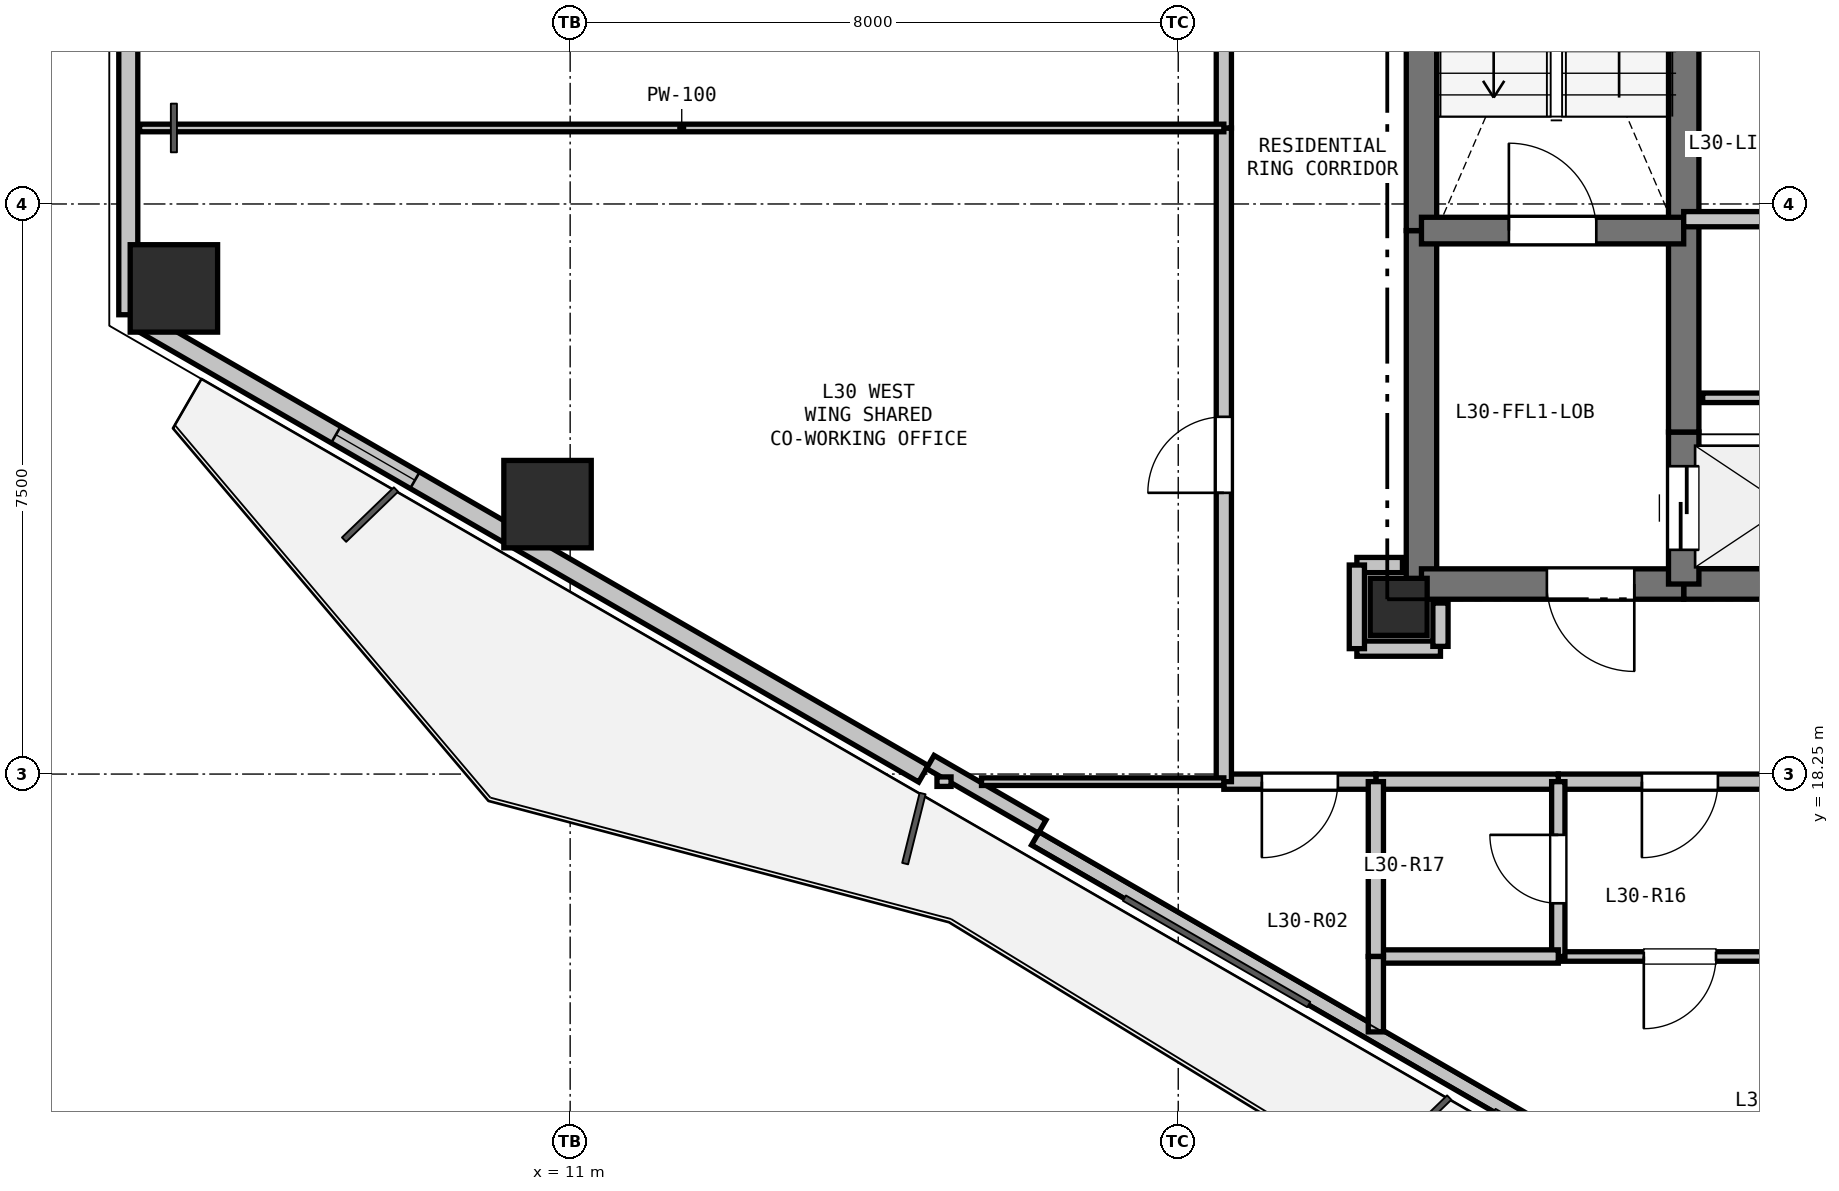
"""IFC4 building model, lengths in metres.
Left out: names, types, materials, properties, quantities, classifications, styles, units other than length and angle.
Written with IfcOpenShell. Run it as: python <this file> out.ifc"""

import sys

from ifc_helpers import new_model, si_unit, direction, frame, frame_2d, origin, origin_2d, place, context, subcontext, project, spatial, rectangle, hollow_rectangle, extrude, element, fill, save


model = new_model("IFC4")
c1 = context("Model", 3, precision=1e-05, world=origin(), true_north=direction((0.0, 1.0)))
c2 = subcontext(c1, "Body", "Model", "MODEL_VIEW")
j1 = project(units=[si_unit("LENGTHUNIT", "METRE"), si_unit("PLANEANGLEUNIT", "RADIAN")], contexts=[c1])
p1 = place(None, origin())
s1 = spatial("IfcSite", under=j1, at=p1, CompositionType="ELEMENT")
p2 = place(p1, origin())
s2 = spatial("IfcBuilding", under=s1, at=p2, CompositionType="ELEMENT")
p3 = place(p2, frame((0.0, 0.0, 109.8)))
s3 = spatial("IfcBuildingStorey", under=s2, at=p3, CompositionType="ELEMENT", Elevation=109.8)
p4 = place(p3, frame((21.9, 20.45, 0.0), z_axis=(0.0, 0.0, 1.0), x_axis=(1.0, 0.0, 0.0)))
e1 = element("IfcColumn", 1, at=p4, inside=s3, PredefinedType="COLUMN", context=c2, shape_type="SweptSolid", body=[
    extrude(rectangle(XDim=0.75, YDim=0.75, at=origin_2d()), origin(), (0.0, 0.0, 1.0), 3.3),
])
for number, where, z_axis, x_axis in (
    (2, (10.702, 21.801, 0.0), (0.0, 0.0, 1.0), (1.0, 0.0, 0.0)),
    (3, (5.787, 24.639, 0.0), (0.0, 0.0, 1.0), (1.0, 0.0, 0.0)),
):
    element("IfcColumn", number, at=place(p3, frame(where, z_axis=z_axis, x_axis=x_axis)), inside=s3, PredefinedType="COLUMN", context=c2, shape_type="SweptSolid", body=[
        extrude(hollow_rectangle(XDim=1.15, YDim=1.15, WallThickness=0.032, at=origin_2d()), origin(), (0.0, 0.0, 1.0), 3.3),
    ])
p5 = place(p3, frame((5.187, 24.293, 0.0), z_axis=(0.0, 0.0, 1.0), x_axis=(0.0, 1.0, 0.0)))
e4 = element("IfcWall", 4, at=p5, inside=s3, PredefinedType="SOLIDWALL", context=c2, shape_type="SweptSolid", body=[
    extrude(rectangle(XDim=4.915, YDim=0.25, at=frame_2d((2.457, 0.0))), origin(), (0.0, 0.0, 1.0), 2.67),
])
p6 = place(p3, frame((26.845, 11.788, 0.0), z_axis=(0.0, 0.0, 1.0), x_axis=(-0.866027010039, 0.499997217876, 0.0)))
e5 = element("IfcWall", 5, at=p6, inside=s3, PredefinedType="PARAPET", context=c2, shape_type="SweptSolid", body=[
    extrude(rectangle(XDim=11.229, YDim=0.2, at=frame_2d((5.615, 0.0))), origin(), (0.0, 0.0, 1.0), 0.2),
])
p7 = place(p3, frame((15.648, 18.253, 0.0), z_axis=(0.0, 0.0, 1.0), x_axis=(-0.866023023012, 0.500004123596, 0.0)))
e6 = element("IfcWall", 6, at=p7, inside=s3, PredefinedType="SOLIDWALL", context=c2, shape_type="SweptSolid", body=[
    extrude(rectangle(XDim=11.93, YDim=0.25, at=frame_2d((5.965, 0.0))), origin(), (0.0, 0.0, 1.0), 2.67),
])
p8 = place(p7, frame((7.725, 0.0, 0.9)))
e7 = element("IfcOpeningElement", 7, at=p8, cuts=e6, PredefinedType="OPENING", context=c2, shape_type="SweptSolid", body=[
    extrude(rectangle(XDim=1.2, YDim=1.5, at=frame_2d((0.6, 0.75))), frame((0.0, 0.135, 0.0), z_axis=(0.0, -1.0, 0.0), x_axis=(1.0, 0.0, 0.0)), (0.0, 0.0, 1.0), 0.27),
])
p9 = place(p3, frame((17.21, 17.559, 0.0), z_axis=(0.0, 0.0, 1.0), x_axis=(-0.866025371046, 0.500000056704, 0.0)))
e8 = element("IfcWall", 8, at=p9, inside=s3, PredefinedType="PARAPET", context=c2, shape_type="SweptSolid", body=[
    extrude(rectangle(XDim=1.7, YDim=0.2, at=frame_2d((0.85, 0.0))), origin(), (0.0, 0.0, 1.0), 2.67),
])
p10 = place(p3, frame((22.2, 20.75, 0.0), z_axis=(0.0, 0.0, 1.0), x_axis=(0.0, 1.0, 0.0)))
e9 = element("IfcWall", 9, at=p10, inside=s3, PredefinedType="SHEAR", context=c2, shape_type="SweptSolid", body=[
    extrude(rectangle(XDim=4.65, YDim=0.4, at=frame_2d((2.325, 0.0))), origin(), (0.0, 0.0, 1.0), 3.05),
])
p11 = place(p3, frame((22.2, 25.4, 0.0), z_axis=(0.0, 0.0, 1.0), x_axis=(0.0, 1.0, 0.0)))
e10 = element("IfcWall", 10, at=p11, inside=s3, PredefinedType="SHEAR", context=c2, shape_type="SweptSolid", body=[
    extrude(rectangle(XDim=7.35, YDim=0.4, at=frame_2d((3.675, 0.0))), origin(), (0.0, 0.0, 1.0), 3.05),
])
p12 = place(p3, frame((28.35, 20.75, 0.0), z_axis=(0.0, 0.0, 1.0), x_axis=(-1.0, 0.0, 0.0)))
e11 = element("IfcWall", 11, at=p12, inside=s3, PredefinedType="SHEAR", context=c2, shape_type="SweptSolid", body=[
    extrude(rectangle(XDim=2.7, YDim=0.4, at=frame_2d((1.35, 0.0))), origin(), (0.0, 0.0, 1.0), 3.05),
])
p13 = place(p3, frame((25.65, 20.75, 0.0), z_axis=(0.0, 0.0, 1.0), x_axis=(-1.0, 0.0, 0.0)))
e12 = element("IfcWall", 12, at=p13, inside=s3, PredefinedType="SHEAR", context=c2, shape_type="SweptSolid", body=[
    extrude(rectangle(XDim=3.45, YDim=0.4, at=frame_2d((1.725, 0.0))), origin(), (0.0, 0.0, 1.0), 3.05),
])
p14 = place(p13, frame((0.65, 0.0, 0.0)))
e13 = element("IfcOpeningElement", 13, at=p14, cuts=e12, PredefinedType="OPENING", context=c2, shape_type="SweptSolid", body=[
    extrude(rectangle(XDim=1.15, YDim=2.15, at=frame_2d((0.575, 1.075))), frame((0.0, 0.21, 0.0), z_axis=(0.0, -1.0, 0.0), x_axis=(1.0, 0.0, 0.0)), (0.0, 0.0, 1.0), 0.42),
])
p15 = place(p3, frame((25.65, 20.75, 0.0), z_axis=(0.0, 0.0, 1.0), x_axis=(0.0, 1.0, 0.0)))
e14 = element("IfcWall", 14, at=p15, inside=s3, PredefinedType="SHEAR", context=c2, shape_type="SweptSolid", body=[
    extrude(rectangle(XDim=2.0, YDim=0.4, at=frame_2d((1.0, 0.0))), origin(), (0.0, 0.0, 1.0), 3.05),
])
p16 = place(p15, frame((0.45, 0.0, 0.0)))
e15 = element("IfcOpeningElement", 15, at=p16, cuts=e14, PredefinedType="OPENING", context=c2, shape_type="SweptSolid", body=[
    extrude(rectangle(XDim=1.1, YDim=2.15, at=frame_2d((0.55, 1.075))), frame((0.0, 0.21, 0.0), z_axis=(0.0, -1.0, 0.0), x_axis=(1.0, 0.0, 0.0)), (0.0, 0.0, 1.0), 0.42),
])
p17 = place(p3, frame((25.65, 22.75, 0.0), z_axis=(0.0, 0.0, 1.0), x_axis=(0.0, 1.0, 0.0)))
e16 = element("IfcWall", 16, at=p17, inside=s3, PredefinedType="SHEAR", context=c2, shape_type="SweptSolid", body=[
    extrude(rectangle(XDim=2.8, YDim=0.4, at=frame_2d((1.4, 0.0))), origin(), (0.0, 0.0, 1.0), 3.05),
])
p18 = place(p3, frame((25.65, 25.55, 0.0), z_axis=(0.0, 0.0, 1.0), x_axis=(0.0, 1.0, 0.0)))
e17 = element("IfcWall", 17, at=p18, inside=s3, PredefinedType="SHEAR", context=c2, shape_type="SweptSolid", body=[
    extrude(rectangle(XDim=2.4, YDim=0.4, at=frame_2d((1.2, 0.0))), origin(), (0.0, 0.0, 1.0), 3.05),
])
p19 = place(p3, frame((22.2, 25.4, 0.0), z_axis=(0.0, 0.0, 1.0), x_axis=(1.0, 0.0, 0.0)))
e18 = element("IfcWall", 18, at=p19, inside=s3, PredefinedType="SHEAR", context=c2, shape_type="SweptSolid", body=[
    extrude(rectangle(XDim=3.45, YDim=0.35, at=frame_2d((1.725, 0.0))), origin(), (0.0, 0.0, 1.0), 3.05),
])
p20 = place(p19, frame((1.15, 0.0, 0.0)))
e19 = element("IfcOpeningElement", 19, at=p20, cuts=e18, PredefinedType="OPENING", context=c2, shape_type="SweptSolid", body=[
    extrude(rectangle(XDim=1.15, YDim=2.15, at=frame_2d((0.575, 1.075))), frame((0.0, 0.185, 0.0), z_axis=(0.0, -1.0, 0.0), x_axis=(1.0, 0.0, 0.0)), (0.0, 0.0, 1.0), 0.37),
])
p21 = place(p3, frame((25.65, 25.55, 0.0), z_axis=(0.0, 0.0, 1.0), x_axis=(1.0, 0.0, 0.0)))
e20 = element("IfcWall", 20, at=p21, inside=s3, PredefinedType="PARTITIONING", context=c2, shape_type="SweptSolid", body=[
    extrude(rectangle(XDim=4.95, YDim=0.2, at=frame_2d((2.475, 0.0))), origin(), (0.0, 0.0, 1.0), 3.05),
])
p22 = place(p3, frame((25.9, 23.2, 0.0), z_axis=(0.0, 0.0, 1.0), x_axis=(1.0, 0.0, 0.0)))
e21 = element("IfcWall", 21, at=p22, inside=s3, PredefinedType="PARTITIONING", context=c2, shape_type="SweptSolid", body=[
    extrude(rectangle(XDim=1.4, YDim=0.125, at=frame_2d((0.7, 0.0))), origin(), (0.0, 0.0, 1.0), 3.05),
])
p23 = place(p3, frame((21.35, 19.9, 0.0), z_axis=(0.0, 0.0, 1.0), x_axis=(1.0, 0.0, 0.0)))
e22 = element("IfcWall", 22, at=p23, inside=s3, PredefinedType="PARTITIONING", context=c2, shape_type="SweptSolid", body=[
    extrude(rectangle(XDim=1.1, YDim=0.2, at=frame_2d((0.55, 0.0))), origin(), (0.0, 0.0, 1.0), 2.423),
])
p24 = place(p3, frame((22.45, 19.93, 0.0), z_axis=(0.0, 0.0, 1.0), x_axis=(0.0, 1.0, 0.0)))
e23 = element("IfcWall", 23, at=p24, inside=s3, PredefinedType="PARTITIONING", context=c2, shape_type="SweptSolid", body=[
    extrude(rectangle(XDim=0.57, YDim=0.2, at=frame_2d((0.285, 0.0))), origin(), (0.0, 0.0, 1.0), 2.423),
])
p25 = place(p3, frame((27.2, 18.15, 0.0), z_axis=(0.0, 0.0, 1.0), x_axis=(-1.0, 0.0, 0.0)))
e24 = element("IfcWall", 24, at=p25, inside=s3, PredefinedType="PARTITIONING", context=c2, shape_type="SweptSolid", body=[
    extrude(rectangle(XDim=3.2, YDim=0.2, at=frame_2d((1.6, 0.0))), origin(), (0.0, 0.0, 1.0), 2.423),
])
p26 = place(p25, frame((1.1, 0.0, 0.0)))
e25 = element("IfcOpeningElement", 25, at=p26, cuts=e24, PredefinedType="OPENING", context=c2, shape_type="SweptSolid", body=[
    extrude(rectangle(XDim=1.0, YDim=2.15, at=frame_2d((0.5, 1.075))), frame((0.0, 0.11, 0.0), z_axis=(0.0, -1.0, 0.0), x_axis=(1.0, 0.0, 0.0)), (0.0, 0.0, 1.0), 0.22),
])
p27 = place(p3, frame((24.0, 18.15, 0.0), z_axis=(0.0, 0.0, 1.0), x_axis=(-1.0, 0.0, 0.0)))
e26 = element("IfcWall", 26, at=p27, inside=s3, PredefinedType="PARTITIONING", context=c2, shape_type="SweptSolid", body=[
    extrude(rectangle(XDim=2.4, YDim=0.2, at=frame_2d((1.2, 0.0))), origin(), (0.0, 0.0, 1.0), 2.423),
])
p28 = place(p3, frame((21.6, 18.15, 0.0), z_axis=(0.0, 0.0, 1.0), x_axis=(-1.0, 0.0, 0.0)))
e27 = element("IfcWall", 27, at=p28, inside=s3, PredefinedType="PARTITIONING", context=c2, shape_type="SweptSolid", body=[
    extrude(rectangle(XDim=2.0, YDim=0.2, at=frame_2d((1.0, 0.0))), origin(), (0.0, 0.0, 1.0), 3.05),
])
p29 = place(p28, frame((0.5, 0.0, 0.0)))
e28 = element("IfcOpeningElement", 28, at=p29, cuts=e27, PredefinedType="OPENING", context=c2, shape_type="SweptSolid", body=[
    extrude(rectangle(XDim=1.0, YDim=2.15, at=frame_2d((0.5, 1.075))), frame((0.0, 0.11, 0.0), z_axis=(0.0, -1.0, 0.0), x_axis=(1.0, 0.0, 0.0)), (0.0, 0.0, 1.0), 0.22),
])
p30 = place(p3, frame((19.6, 18.15, 0.0), z_axis=(0.0, 0.0, 1.0), x_axis=(0.0, 1.0, 0.0)))
e29 = element("IfcWall", 29, at=p30, inside=s3, PredefinedType="PARTITIONING", context=c2, shape_type="SweptSolid", body=[
    extrude(rectangle(XDim=8.6, YDim=0.2, at=frame_2d((4.3, 0.0))), origin(), (0.0, 0.0, 1.0), 2.423),
])
p31 = place(p30, frame((3.8, 0.0, 0.0)))
e30 = element("IfcOpeningElement", 30, at=p31, cuts=e29, PredefinedType="OPENING", context=c2, shape_type="SweptSolid", body=[
    extrude(rectangle(XDim=1.0, YDim=2.15, at=frame_2d((0.5, 1.075))), frame((0.0, 0.11, 0.0), z_axis=(0.0, -1.0, 0.0), x_axis=(1.0, 0.0, 0.0)), (0.0, 0.0, 1.0), 0.22),
])
p32 = place(p3, frame((19.6, 26.75, 0.0), z_axis=(0.0, 0.0, 1.0), x_axis=(0.0, 1.0, 0.0)))
e31 = element("IfcWall", 31, at=p32, inside=s3, PredefinedType="PARTITIONING", context=c2, shape_type="SweptSolid", body=[
    extrude(rectangle(XDim=8.6, YDim=0.2, at=frame_2d((4.3, 0.0))), origin(), (0.0, 0.0, 1.0), 2.423),
])
p33 = place(p32, frame((3.4, 0.0, 0.0)))
e32 = element("IfcOpeningElement", 32, at=p33, cuts=e31, PredefinedType="OPENING", context=c2, shape_type="SweptSolid", body=[
    extrude(rectangle(XDim=1.8, YDim=2.2, at=frame_2d((0.9, 1.1))), frame((0.0, 0.11, 0.0), z_axis=(0.0, -1.0, 0.0), x_axis=(1.0, 0.0, 0.0)), (0.0, 0.0, 1.0), 0.22),
])
p34 = place(p3, frame((21.95, 21.0, 0.0), z_axis=(0.0, 0.0, 1.0), x_axis=(-1.0, 0.0, 0.0)))
e33 = element("IfcWall", 33, at=p34, inside=s3, PredefinedType="PARTITIONING", context=c2, shape_type="SweptSolid", body=[
    extrude(rectangle(XDim=0.6, YDim=0.2, at=frame_2d((0.3, 0.0))), origin(), (0.0, 0.0, 1.0), 2.498),
])
p35 = place(p3, frame((21.35, 21.0, 0.0), z_axis=(0.0, 0.0, 1.0), x_axis=(0.0, -1.0, 0.0)))
e34 = element("IfcWall", 34, at=p35, inside=s3, PredefinedType="PARTITIONING", context=c2, shape_type="SweptSolid", body=[
    extrude(rectangle(XDim=1.1, YDim=0.2, at=frame_2d((0.55, 0.0))), origin(), (0.0, 0.0, 1.0), 2.423),
])
p36 = place(p3, frame((27.2, 15.85, 0.0), z_axis=(0.0, 0.0, 1.0), x_axis=(-1.0, 0.0, 0.0)))
e35 = element("IfcWall", 35, at=p36, inside=s3, PredefinedType="PARTITIONING", context=c2, shape_type="SweptSolid", body=[
    extrude(rectangle(XDim=3.2, YDim=0.125, at=frame_2d((1.6, 0.0))), origin(), (0.0, 0.0, 1.0), 2.423),
])
p37 = place(p36, frame((1.125, 0.0, 0.0)))
e36 = element("IfcOpeningElement", 36, at=p37, cuts=e35, PredefinedType="OPENING", context=c2, shape_type="SweptSolid", body=[
    extrude(rectangle(XDim=0.95, YDim=2.1, at=frame_2d((0.475, 1.05))), frame((0.0, 0.073, 0.0), z_axis=(0.0, -1.0, 0.0), x_axis=(1.0, 0.0, 0.0)), (0.0, 0.0, 1.0), 0.145),
])
p38 = place(p3, frame((24.0, 15.85, 0.0), z_axis=(0.0, 0.0, 1.0), x_axis=(0.0, 1.0, 0.0)))
e37 = element("IfcWall", 37, at=p38, inside=s3, PredefinedType="PLUMBINGWALL", context=c2, shape_type="SweptSolid", body=[
    extrude(rectangle(XDim=2.3, YDim=0.175, at=frame_2d((1.15, 0.0))), origin(), (0.0, 0.0, 1.0), 2.423),
])
p39 = place(p38, frame((0.7, 0.0, 0.0)))
e38 = element("IfcOpeningElement", 38, at=p39, cuts=e37, PredefinedType="OPENING", context=c2, shape_type="SweptSolid", body=[
    extrude(rectangle(XDim=0.9, YDim=2.1, at=frame_2d((0.45, 1.05))), frame((0.0, 0.097, 0.0), z_axis=(0.0, -1.0, 0.0), x_axis=(1.0, 0.0, 0.0)), (0.0, 0.0, 1.0), 0.195),
])
p40 = place(p3, frame((24.0, 15.85, 0.0), z_axis=(0.0, 0.0, 1.0), x_axis=(-1.0, 0.0, 0.0)))
e39 = element("IfcWall", 39, at=p40, inside=s3, PredefinedType="PLUMBINGWALL", context=c2, shape_type="SweptSolid", body=[
    extrude(rectangle(XDim=2.4, YDim=0.175, at=frame_2d((1.2, 0.0))), origin(), (0.0, 0.0, 1.0), 3.05),
])
p41 = place(p3, frame((21.6, 15.85, 0.0), z_axis=(0.0, 0.0, 1.0), x_axis=(0.0, 1.0, 0.0)))
e40 = element("IfcWall", 40, at=p41, inside=s3, PredefinedType="PARTITIONING", context=c2, shape_type="SweptSolid", body=[
    extrude(rectangle(XDim=2.3, YDim=0.2, at=frame_2d((1.15, 0.0))), origin(), (0.0, 0.0, 1.0), 3.05),
])
p42 = place(p3, frame((15.826, 18.15, 0.0), z_axis=(0.0, 0.0, 1.0), x_axis=(1.0, 0.0, 0.0)))
e41 = element("IfcWall", 41, at=p42, inside=s3, PredefinedType="PARTITIONING", context=c2, shape_type="SweptSolid", body=[
    extrude(rectangle(XDim=0.185, YDim=0.125, at=frame_2d((0.093, 0.0))), origin(), (0.0, 0.0, 1.0), 3.05),
])
p43 = place(p3, frame((16.412, 18.15, 0.0), z_axis=(0.0, 0.0, 1.0), x_axis=(1.0, 0.0, 0.0)))
e42 = element("IfcWall", 42, at=p43, inside=s3, PredefinedType="PARTITIONING", context=c2, shape_type="SweptSolid", body=[
    extrude(rectangle(XDim=3.188, YDim=0.1, at=frame_2d((1.594, 0.0))), origin(), (0.0, 0.0, 1.0), 2.365),
])
p44 = place(p3, frame((21.6, 15.85, 0.0), z_axis=(0.0, 0.0, 1.0), x_axis=(0.0, -1.0, 0.0)))
e43 = element("IfcWall", 43, at=p44, inside=s3, PredefinedType="PARTITIONING", context=c2, shape_type="SweptSolid", body=[
    extrude(rectangle(XDim=0.992, YDim=0.2, at=frame_2d((0.496, 0.0))), origin(), (0.0, 0.0, 1.0), 2.365),
])
p45 = place(p3, frame((5.336, 26.75, 0.0), z_axis=(0.0, 0.0, 1.0), x_axis=(1.0, 0.0, 0.0)))
e44 = element("IfcWall", 44, at=p45, inside=s3, PredefinedType="PARTITIONING", context=c2, shape_type="SweptSolid", body=[
    extrude(rectangle(XDim=14.264, YDim=0.1, at=frame_2d((7.132, 0.0))), origin(), (0.0, 0.0, 1.0), 2.714),
])
p46 = place(p8, origin())
e45 = element("IfcWindow", 45, at=p46, inside=s3, PartitioningType="SINGLE_PANEL", PredefinedType="WINDOW", context=c2, shape_type="SweptSolid", body=[
    extrude(rectangle(XDim=1.2, YDim=1.5, at=frame_2d((0.6, 0.75))), frame((0.0, 0.03, 0.0), z_axis=(0.0, -1.0, 0.0), x_axis=(1.0, 0.0, 0.0)), (0.0, 0.0, 1.0), 0.06),
])
fill(e7, e45)
p47 = place(p16, origin())
e46 = element("IfcDoor", 46, at=p47, inside=s3, OperationType="SLIDING_TO_LEFT", PredefinedType="DOOR", context=c2, shape_type="SweptSolid", body=[
    extrude(rectangle(XDim=1.1, YDim=2.15, at=frame_2d((0.55, 1.075))), frame((0.0, 0.025, 0.0), z_axis=(0.0, -1.0, 0.0), x_axis=(1.0, 0.0, 0.0)), (0.0, 0.0, 1.0), 0.05),
])
fill(e15, e46)
p48 = place(p20, origin())
e47 = element("IfcDoor", 47, at=p48, inside=s3, OperationType="SINGLE_SWING_LEFT", PredefinedType="DOOR", context=c2, shape_type="SweptSolid", body=[
    extrude(rectangle(XDim=1.15, YDim=2.15, at=frame_2d((0.575, 1.075))), frame((0.0, 0.025, 0.0), z_axis=(0.0, -1.0, 0.0), x_axis=(1.0, 0.0, 0.0)), (0.0, 0.0, 1.0), 0.05),
])
fill(e19, e47)
p49 = place(p14, origin())
e48 = element("IfcDoor", 48, at=p49, inside=s3, OperationType="SINGLE_SWING_LEFT", PredefinedType="DOOR", context=c2, shape_type="SweptSolid", body=[
    extrude(rectangle(XDim=1.15, YDim=2.15, at=frame_2d((0.575, 1.075))), frame((0.0, 0.025, 0.0), z_axis=(0.0, -1.0, 0.0), x_axis=(1.0, 0.0, 0.0)), (0.0, 0.0, 1.0), 0.05),
])
fill(e13, e48)
p50 = place(p26, origin())
e49 = element("IfcDoor", 49, at=p50, inside=s3, OperationType="SINGLE_SWING_RIGHT", PredefinedType="DOOR", context=c2, shape_type="SweptSolid", body=[
    extrude(rectangle(XDim=1.0, YDim=2.15, at=frame_2d((0.5, 1.075))), frame((0.0, 0.025, 0.0), z_axis=(0.0, -1.0, 0.0), x_axis=(1.0, 0.0, 0.0)), (0.0, 0.0, 1.0), 0.05),
])
fill(e25, e49)
p51 = place(p29, origin())
e50 = element("IfcDoor", 50, at=p51, inside=s3, OperationType="SINGLE_SWING_RIGHT", PredefinedType="DOOR", context=c2, shape_type="SweptSolid", body=[
    extrude(rectangle(XDim=1.0, YDim=2.15, at=frame_2d((0.5, 1.075))), frame((0.0, 0.025, 0.0), z_axis=(0.0, -1.0, 0.0), x_axis=(1.0, 0.0, 0.0)), (0.0, 0.0, 1.0), 0.05),
])
fill(e28, e50)
p52 = place(p31, origin())
e51 = element("IfcDoor", 51, at=p52, inside=s3, OperationType="SINGLE_SWING_LEFT", PredefinedType="DOOR", context=c2, shape_type="SweptSolid", body=[
    extrude(rectangle(XDim=1.0, YDim=2.15, at=frame_2d((0.5, 1.075))), frame((0.0, 0.025, 0.0), z_axis=(0.0, -1.0, 0.0), x_axis=(1.0, 0.0, 0.0)), (0.0, 0.0, 1.0), 0.05),
])
fill(e30, e51)
p53 = place(p39, origin())
e52 = element("IfcDoor", 52, at=p53, inside=s3, OperationType="SINGLE_SWING_RIGHT", PredefinedType="DOOR", context=c2, shape_type="SweptSolid", body=[
    extrude(rectangle(XDim=0.9, YDim=2.1, at=frame_2d((0.45, 1.05))), frame((0.0, 0.025, 0.0), z_axis=(0.0, -1.0, 0.0), x_axis=(1.0, 0.0, 0.0)), (0.0, 0.0, 1.0), 0.05),
])
fill(e38, e52)
p54 = place(p37, origin())
e53 = element("IfcDoor", 53, at=p54, inside=s3, OperationType="SINGLE_SWING_RIGHT", PredefinedType="DOOR", context=c2, shape_type="SweptSolid", body=[
    extrude(rectangle(XDim=0.95, YDim=2.1, at=frame_2d((0.475, 1.05))), frame((0.0, 0.025, 0.0), z_axis=(0.0, -1.0, 0.0), x_axis=(1.0, 0.0, 0.0)), (0.0, 0.0, 1.0), 0.05),
])
fill(e36, e53)
save(model, sys.argv[1])
